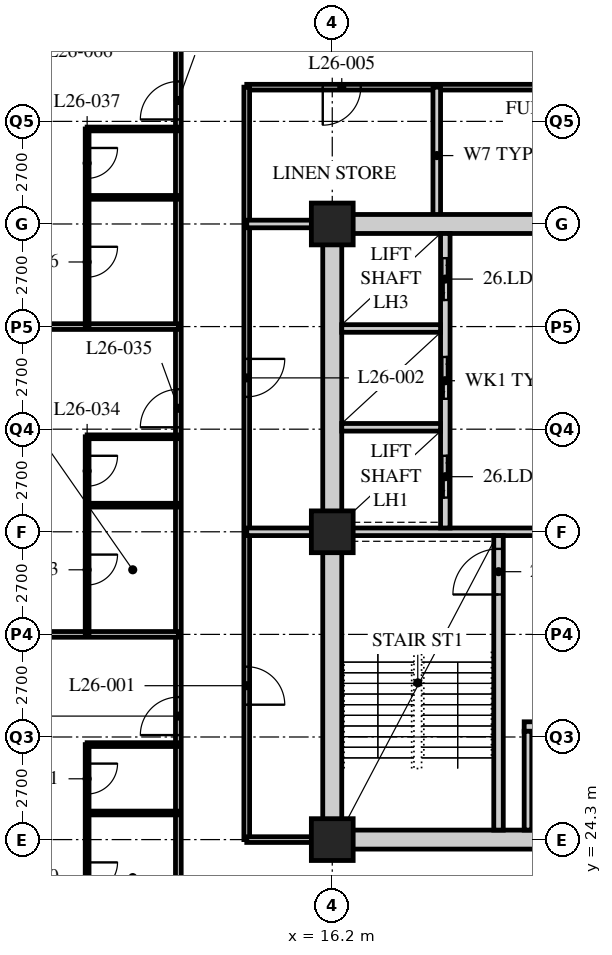
"""IFC4 building model, lengths in metres.
Left out: names, types, materials, properties, quantities, classifications, styles, units other than length and angle.
Written with IfcOpenShell. Run it as: python <this file> out.ifc"""

import sys

from ifc_helpers import new_model, si_unit, direction, frame, frame_2d, origin, origin_2d, place, context, subcontext, project, spatial, rectangle, hollow_rectangle, extrude, element, fill, save


model = new_model("IFC4")
c1 = context("Model", 3, precision=1e-05, world=origin(), true_north=direction((0.0, 1.0)))
c2 = subcontext(c1, "Body", "Model", "MODEL_VIEW")
j1 = project(units=[si_unit("LENGTHUNIT", "METRE"), si_unit("PLANEANGLEUNIT", "RADIAN")], contexts=[c1])
p1 = place(None, origin())
s1 = spatial("IfcSite", under=j1, at=p1, CompositionType="ELEMENT")
p2 = place(p1, origin())
s2 = spatial("IfcBuilding", under=s1, at=p2, CompositionType="ELEMENT")
p3 = place(p2, frame((0.0, 0.0, 106.8)))
s3 = spatial("IfcBuildingStorey", under=s2, at=p3, CompositionType="ELEMENT", Elevation=106.8)
for number, where, z_axis, x_axis in (
    (1, (16.2, 24.3, 0.0), (0.0, 0.0, 1.0), (1.0, 0.0, 0.0)),
    (2, (16.2, 32.4, 0.0), (0.0, 0.0, 1.0), (1.0, 0.0, 0.0)),
    (3, (16.2, 40.5, 0.0), (0.0, 0.0, 1.0), (1.0, 0.0, 0.0)),
):
    element("IfcColumn", number, at=place(p3, frame(where, z_axis=z_axis, x_axis=x_axis)), inside=s3, PredefinedType="COLUMN", context=c2, shape_type="SweptSolid", body=[
        extrude(hollow_rectangle(XDim=1.1, YDim=1.1, WallThickness=0.1, at=origin_2d()), origin(), (0.0, 0.0, 1.0), 3.4),
    ])
p4 = place(p3, frame((12.15, 21.6, 0.0), z_axis=(0.0, 0.0, 1.0), x_axis=(0.0, 1.0, 0.0)))
e4 = element("IfcWall", 4, at=p4, inside=s3, PredefinedType="PARTITIONING", context=c2, shape_type="SweptSolid", body=[
    extrude(rectangle(XDim=24.3, YDim=0.15, at=frame_2d((12.15, 0.0))), origin(), (0.0, 0.0, 1.0), 3.19),
])
p5 = place(p4, frame((5.45, 0.0, 0.0)))
e5 = element("IfcOpeningElement", 5, at=p5, cuts=e4, PredefinedType="OPENING", context=c2, shape_type="SweptSolid", body=[
    extrude(rectangle(XDim=1.0, YDim=2.1, at=frame_2d((0.5, 1.05))), frame((0.0, 0.085, 0.0), z_axis=(0.0, -1.0, 0.0), x_axis=(1.0, 0.0, 0.0)), (0.0, 0.0, 1.0), 0.17),
])
p6 = place(p4, frame((13.55, 0.0, 0.0)))
e6 = element("IfcOpeningElement", 6, at=p6, cuts=e4, PredefinedType="OPENING", context=c2, shape_type="SweptSolid", body=[
    extrude(rectangle(XDim=1.0, YDim=2.1, at=frame_2d((0.5, 1.05))), frame((0.0, 0.085, 0.0), z_axis=(0.0, -1.0, 0.0), x_axis=(1.0, 0.0, 0.0)), (0.0, 0.0, 1.0), 0.17),
])
p7 = place(p4, frame((21.65, 0.0, 0.0)))
e7 = element("IfcOpeningElement", 7, at=p7, cuts=e4, PredefinedType="OPENING", context=c2, shape_type="SweptSolid", body=[
    extrude(rectangle(XDim=1.0, YDim=2.1, at=frame_2d((0.5, 1.05))), frame((0.0, 0.085, 0.0), z_axis=(0.0, -1.0, 0.0), x_axis=(1.0, 0.0, 0.0)), (0.0, 0.0, 1.0), 0.17),
])
p8 = place(p3, frame((27.14, 44.1, 0.0), z_axis=(0.0, 0.0, 1.0), x_axis=(-1.0, 0.0, 0.0)))
e8 = element("IfcWall", 8, at=p8, inside=s3, PredefinedType="PARTITIONING", context=c2, shape_type="SweptSolid", body=[
    extrude(rectangle(XDim=13.19, YDim=0.15, at=frame_2d((6.595, 0.0))), origin(), (0.0, 0.0, 1.0), 3.19),
])
p9 = place(p8, frame((10.19, 0.0, 0.0)))
e9 = element("IfcOpeningElement", 9, at=p9, cuts=e8, PredefinedType="OPENING", context=c2, shape_type="SweptSolid", body=[
    extrude(rectangle(XDim=1.0, YDim=2.1, at=frame_2d((0.5, 1.05))), frame((0.0, 0.085, 0.0), z_axis=(0.0, -1.0, 0.0), x_axis=(1.0, 0.0, 0.0)), (0.0, 0.0, 1.0), 0.17),
])
p10 = place(p8, frame((3.59, 0.0, 0.0)))
e10 = element("IfcOpeningElement", 10, at=p10, cuts=e8, PredefinedType="OPENING", context=c2, shape_type="SweptSolid", body=[
    extrude(rectangle(XDim=1.0, YDim=2.1, at=frame_2d((0.5, 1.05))), frame((0.0, 0.085, 0.0), z_axis=(0.0, -1.0, 0.0), x_axis=(1.0, 0.0, 0.0)), (0.0, 0.0, 1.0), 0.17),
])
p11 = place(p3, frame((13.95, 44.1, 0.0), z_axis=(0.0, 0.0, 1.0), x_axis=(0.0, -1.0, 0.0)))
e11 = element("IfcWall", 11, at=p11, inside=s3, PredefinedType="PARTITIONING", context=c2, shape_type="SweptSolid", body=[
    extrude(rectangle(XDim=19.8, YDim=0.15, at=frame_2d((9.9, 0.0))), origin(), (0.0, 0.0, 1.0), 3.19),
])
p12 = place(p11, frame((15.25, 0.0, 0.0)))
e12 = element("IfcOpeningElement", 12, at=p12, cuts=e11, PredefinedType="OPENING", context=c2, shape_type="SweptSolid", body=[
    extrude(rectangle(XDim=1.0, YDim=2.1, at=frame_2d((0.5, 1.05))), frame((0.0, 0.085, 0.0), z_axis=(0.0, -1.0, 0.0), x_axis=(1.0, 0.0, 0.0)), (0.0, 0.0, 1.0), 0.17),
])
p13 = place(p11, frame((7.15, 0.0, 0.0)))
e13 = element("IfcOpeningElement", 13, at=p13, cuts=e11, PredefinedType="OPENING", context=c2, shape_type="SweptSolid", body=[
    extrude(rectangle(XDim=1.0, YDim=2.1, at=frame_2d((0.5, 1.05))), frame((0.0, 0.085, 0.0), z_axis=(0.0, -1.0, 0.0), x_axis=(1.0, 0.0, 0.0)), (0.0, 0.0, 1.0), 0.17),
])
p14 = place(p3, frame((13.95, 24.3, 0.0), z_axis=(0.0, 0.0, 1.0), x_axis=(1.0, 0.0, 0.0)))
e14 = element("IfcWall", 14, at=p14, inside=s3, PredefinedType="PARTITIONING", context=c2, shape_type="SweptSolid", body=[
    extrude(rectangle(XDim=2.05, YDim=0.15, at=frame_2d((1.025, 0.0))), origin(), (0.0, 0.0, 1.0), 3.19),
])
p15 = place(p3, frame((13.95, 32.4, 0.0), z_axis=(0.0, 0.0, 1.0), x_axis=(1.0, 0.0, 0.0)))
e15 = element("IfcWall", 15, at=p15, inside=s3, PredefinedType="SOLIDWALL", context=c2, shape_type="SweptSolid", body=[
    extrude(rectangle(XDim=2.25, YDim=0.2, at=frame_2d((1.125, 0.0))), origin(), (0.0, 0.0, 1.0), 3.19),
])
p16 = place(p3, frame((18.95, 44.1, 0.0), z_axis=(0.0, 0.0, 1.0), x_axis=(0.0, -1.0, 0.0)))
e16 = element("IfcWall", 16, at=p16, inside=s3, PredefinedType="SOLIDWALL", context=c2, shape_type="SweptSolid", body=[
    extrude(rectangle(XDim=3.6, YDim=0.2, at=frame_2d((1.8, 0.0))), origin(), (0.0, 0.0, 1.0), 3.19),
])
p17 = place(p3, frame((13.95, 40.5, 0.0), z_axis=(0.0, 0.0, 1.0), x_axis=(1.0, 0.0, 0.0)))
e17 = element("IfcWall", 17, at=p17, inside=s3, PredefinedType="SOLIDWALL", context=c2, shape_type="SweptSolid", body=[
    extrude(rectangle(XDim=2.25, YDim=0.2, at=frame_2d((1.125, 0.0))), origin(), (0.0, 0.0, 1.0), 3.19),
])
p18 = place(p3, frame((9.75, 21.6, 0.0), z_axis=(0.0, 0.0, 1.0), x_axis=(0.0, 1.0, 0.0)))
e18 = element("IfcWall", 18, at=p18, inside=s3, PredefinedType="PARTITIONING", context=c2, shape_type="SweptSolid", body=[
    extrude(rectangle(XDim=5.2, YDim=0.1, at=frame_2d((2.6, 0.0))), origin(), (0.0, 0.0, 1.0), 3.19),
])
p19 = place(p18, frame((1.3, 0.0, 0.0)))
e19 = element("IfcOpeningElement", 19, at=p19, cuts=e18, PredefinedType="OPENING", context=c2, shape_type="SweptSolid", body=[
    extrude(rectangle(XDim=0.8, YDim=2.1, at=frame_2d((0.4, 1.05))), frame((0.0, 0.06, 0.0), z_axis=(0.0, -1.0, 0.0), x_axis=(1.0, 0.0, 0.0)), (0.0, 0.0, 1.0), 0.12),
])
p20 = place(p18, frame((3.9, 0.0, 0.0)))
e20 = element("IfcOpeningElement", 20, at=p20, cuts=e18, PredefinedType="OPENING", context=c2, shape_type="SweptSolid", body=[
    extrude(rectangle(XDim=0.8, YDim=2.1, at=frame_2d((0.4, 1.05))), frame((0.0, 0.06, 0.0), z_axis=(0.0, -1.0, 0.0), x_axis=(1.0, 0.0, 0.0)), (0.0, 0.0, 1.0), 0.12),
])
for number, where, z_axis, x_axis in (
    (21, (12.15, 25.0, 0.0), (0.0, 0.0, 1.0), (-1.0, 0.0, 0.0)),
    (22, (12.15, 26.8, 0.0), (0.0, 0.0, 1.0), (-1.0, 0.0, 0.0)),
):
    element("IfcWall", number, at=place(p3, frame(where, z_axis=z_axis, x_axis=x_axis)), inside=s3, PredefinedType="PARTITIONING", context=c2, shape_type="SweptSolid", body=[
        extrude(rectangle(XDim=2.4, YDim=0.1, at=frame_2d((1.2, 0.0))), origin(), (0.0, 0.0, 1.0), 3.19),
    ])
p21 = place(p3, frame((12.15, 29.7, 0.0), z_axis=(0.0, 0.0, 1.0), x_axis=(-1.0, 0.0, 0.0)))
e23 = element("IfcWall", 23, at=p21, inside=s3, PredefinedType="PARTITIONING", context=c2, shape_type="SweptSolid", body=[
    extrude(rectangle(XDim=11.85, YDim=0.15, at=frame_2d((5.925, 0.0))), origin(), (0.0, 0.0, 1.0), 2.578),
])
p22 = place(p3, frame((9.75, 29.7, 0.0), z_axis=(0.0, 0.0, 1.0), x_axis=(0.0, 1.0, 0.0)))
e24 = element("IfcWall", 24, at=p22, inside=s3, PredefinedType="PARTITIONING", context=c2, shape_type="SweptSolid", body=[
    extrude(rectangle(XDim=5.2, YDim=0.1, at=frame_2d((2.6, 0.0))), origin(), (0.0, 0.0, 1.0), 3.19),
])
p23 = place(p22, frame((1.3, 0.0, 0.0)))
e25 = element("IfcOpeningElement", 25, at=p23, cuts=e24, PredefinedType="OPENING", context=c2, shape_type="SweptSolid", body=[
    extrude(rectangle(XDim=0.8, YDim=2.1, at=frame_2d((0.4, 1.05))), frame((0.0, 0.06, 0.0), z_axis=(0.0, -1.0, 0.0), x_axis=(1.0, 0.0, 0.0)), (0.0, 0.0, 1.0), 0.12),
])
p24 = place(p22, frame((3.9, 0.0, 0.0)))
e26 = element("IfcOpeningElement", 26, at=p24, cuts=e24, PredefinedType="OPENING", context=c2, shape_type="SweptSolid", body=[
    extrude(rectangle(XDim=0.8, YDim=2.1, at=frame_2d((0.4, 1.05))), frame((0.0, 0.06, 0.0), z_axis=(0.0, -1.0, 0.0), x_axis=(1.0, 0.0, 0.0)), (0.0, 0.0, 1.0), 0.12),
])
for number, where, z_axis, x_axis in (
    (27, (12.15, 33.1, 0.0), (0.0, 0.0, 1.0), (-1.0, 0.0, 0.0)),
    (28, (12.15, 34.9, 0.0), (0.0, 0.0, 1.0), (-1.0, 0.0, 0.0)),
):
    element("IfcWall", number, at=place(p3, frame(where, z_axis=z_axis, x_axis=x_axis)), inside=s3, PredefinedType="PARTITIONING", context=c2, shape_type="SweptSolid", body=[
        extrude(rectangle(XDim=2.4, YDim=0.1, at=frame_2d((1.2, 0.0))), origin(), (0.0, 0.0, 1.0), 3.19),
    ])
p25 = place(p3, frame((12.15, 37.8, 0.0), z_axis=(0.0, 0.0, 1.0), x_axis=(-1.0, 0.0, 0.0)))
e29 = element("IfcWall", 29, at=p25, inside=s3, PredefinedType="PARTITIONING", context=c2, shape_type="SweptSolid", body=[
    extrude(rectangle(XDim=11.85, YDim=0.15, at=frame_2d((5.925, 0.0))), origin(), (0.0, 0.0, 1.0), 2.578),
])
p26 = place(p3, frame((9.75, 37.8, 0.0), z_axis=(0.0, 0.0, 1.0), x_axis=(0.0, 1.0, 0.0)))
e30 = element("IfcWall", 30, at=p26, inside=s3, PredefinedType="PARTITIONING", context=c2, shape_type="SweptSolid", body=[
    extrude(rectangle(XDim=5.2, YDim=0.1, at=frame_2d((2.6, 0.0))), origin(), (0.0, 0.0, 1.0), 3.19),
])
p27 = place(p26, frame((1.3, 0.0, 0.0)))
e31 = element("IfcOpeningElement", 31, at=p27, cuts=e30, PredefinedType="OPENING", context=c2, shape_type="SweptSolid", body=[
    extrude(rectangle(XDim=0.8, YDim=2.1, at=frame_2d((0.4, 1.05))), frame((0.0, 0.06, 0.0), z_axis=(0.0, -1.0, 0.0), x_axis=(1.0, 0.0, 0.0)), (0.0, 0.0, 1.0), 0.12),
])
p28 = place(p26, frame((3.9, 0.0, 0.0)))
e32 = element("IfcOpeningElement", 32, at=p28, cuts=e30, PredefinedType="OPENING", context=c2, shape_type="SweptSolid", body=[
    extrude(rectangle(XDim=0.8, YDim=2.1, at=frame_2d((0.4, 1.05))), frame((0.0, 0.06, 0.0), z_axis=(0.0, -1.0, 0.0), x_axis=(1.0, 0.0, 0.0)), (0.0, 0.0, 1.0), 0.12),
])
for number, where, z_axis, x_axis in (
    (33, (12.15, 41.2, 0.0), (0.0, 0.0, 1.0), (-1.0, 0.0, 0.0)),
    (34, (12.15, 43.0, 0.0), (0.0, 0.0, 1.0), (-1.0, 0.0, 0.0)),
):
    element("IfcWall", number, at=place(p3, frame(where, z_axis=z_axis, x_axis=x_axis)), inside=s3, PredefinedType="PARTITIONING", context=c2, shape_type="SweptSolid", body=[
        extrude(rectangle(XDim=2.4, YDim=0.1, at=frame_2d((1.2, 0.0))), origin(), (0.0, 0.0, 1.0), 3.19),
    ])
p29 = place(p3, frame((15.95, 24.3, 0.0), z_axis=(0.0, 0.0, 1.0), x_axis=(1.0, 0.0, 0.0)))
e35 = element("IfcWall", 35, at=p29, inside=s3, PredefinedType="SOLIDWALL", context=c2, shape_type="SweptSolid", body=[
    extrude(rectangle(XDim=24.8, YDim=0.5, at=frame_2d((12.4, 0.0))), origin(), (0.0, 0.0, 1.0), 2.54),
])
p30 = place(p29, frame((11.5, 0.0, 0.0)))
e36 = element("IfcOpeningElement", 36, at=p30, cuts=e35, PredefinedType="OPENING", context=c2, shape_type="SweptSolid", body=[
    extrude(rectangle(XDim=1.8, YDim=2.4, at=frame_2d((0.9, 1.2))), frame((0.0, 0.26, 0.0), z_axis=(0.0, -1.0, 0.0), x_axis=(1.0, 0.0, 0.0)), (0.0, 0.0, 1.0), 0.52),
])
p31 = place(p3, frame((15.95, 40.5, 0.0), z_axis=(0.0, 0.0, 1.0), x_axis=(1.0, 0.0, 0.0)))
e37 = element("IfcWall", 37, at=p31, inside=s3, PredefinedType="SOLIDWALL", context=c2, shape_type="SweptSolid", body=[
    extrude(rectangle(XDim=24.8, YDim=0.5, at=frame_2d((12.4, 0.0))), origin(), (0.0, 0.0, 1.0), 2.54),
])
p32 = place(p31, frame((11.5, 0.0, 0.0)))
e38 = element("IfcOpeningElement", 38, at=p32, cuts=e37, PredefinedType="OPENING", context=c2, shape_type="SweptSolid", body=[
    extrude(rectangle(XDim=1.8, YDim=2.4, at=frame_2d((0.9, 1.2))), frame((0.0, 0.26, 0.0), z_axis=(0.0, -1.0, 0.0), x_axis=(1.0, 0.0, 0.0)), (0.0, 0.0, 1.0), 0.52),
])
p33 = place(p3, frame((16.2, 24.55, 0.0), z_axis=(0.0, 0.0, 1.0), x_axis=(0.0, 1.0, 0.0)))
e39 = element("IfcWall", 39, at=p33, inside=s3, PredefinedType="SOLIDWALL", context=c2, shape_type="SweptSolid", body=[
    extrude(rectangle(XDim=15.7, YDim=0.5, at=frame_2d((7.85, 0.0))), origin(), (0.0, 0.0, 1.0), 2.578),
])
p34 = place(p3, frame((16.45, 32.4, 0.0), z_axis=(0.0, 0.0, 1.0), x_axis=(1.0, 0.0, 0.0)))
e40 = element("IfcWall", 40, at=p34, inside=s3, PredefinedType="SOLIDWALL", context=c2, shape_type="SweptSolid", body=[
    extrude(rectangle(XDim=7.95, YDim=0.2, at=frame_2d((3.975, 0.0))), origin(), (0.0, 0.0, 1.0), 2.578),
])
p35 = place(p3, frame((20.575, 24.55, 0.0), z_axis=(0.0, 0.0, 1.0), x_axis=(0.0, 1.0, 0.0)))
e41 = element("IfcWall", 41, at=p35, inside=s3, PredefinedType="SOLIDWALL", context=c2, shape_type="SweptSolid", body=[
    extrude(rectangle(XDim=7.75, YDim=0.25, at=frame_2d((3.875, 0.0))), origin(), (0.0, 0.0, 1.0), 3.19),
])
p36 = place(p35, frame((6.2, 0.0, 0.0)))
e42 = element("IfcOpeningElement", 42, at=p36, cuts=e41, PredefinedType="OPENING", context=c2, shape_type="SweptSolid", body=[
    extrude(rectangle(XDim=1.2, YDim=2.1, at=frame_2d((0.6, 1.05))), frame((0.0, 0.135, 0.0), z_axis=(0.0, -1.0, 0.0), x_axis=(1.0, 0.0, 0.0)), (0.0, 0.0, 1.0), 0.27),
])
p37 = place(p3, frame((21.25, 27.275, 0.0), z_axis=(0.0, 0.0, 1.0), x_axis=(1.0, 0.0, 0.0)))
e43 = element("IfcWall", 43, at=p37, inside=s3, PredefinedType="SOLIDWALL", context=c2, shape_type="SweptSolid", body=[
    extrude(rectangle(XDim=2.95, YDim=0.25, at=frame_2d((1.475, 0.0))), origin(), (0.0, 0.0, 1.0), 3.19),
])
p38 = place(p37, frame((0.95, 0.0, 0.0)))
e44 = element("IfcOpeningElement", 44, at=p38, cuts=e43, PredefinedType="OPENING", context=c2, shape_type="SweptSolid", body=[
    extrude(rectangle(XDim=1.1, YDim=2.4, at=frame_2d((0.55, 1.2))), frame((0.0, 0.135, 0.0), z_axis=(0.0, -1.0, 0.0), x_axis=(1.0, 0.0, 0.0)), (0.0, 0.0, 1.0), 0.27),
])
p39 = place(p3, frame((21.35, 24.55, 0.0), z_axis=(0.0, 0.0, 1.0), x_axis=(0.0, 1.0, 0.0)))
e45 = element("IfcWall", 45, at=p39, inside=s3, PredefinedType="SOLIDWALL", context=c2, shape_type="SweptSolid", body=[
    extrude(rectangle(XDim=2.6, YDim=0.2, at=frame_2d((1.3, 0.0))), origin(), (0.0, 0.0, 1.0), 3.19),
])
p40 = place(p3, frame((19.175, 32.5, 0.0), z_axis=(0.0, 0.0, 1.0), x_axis=(0.0, 1.0, 0.0)))
e46 = element("IfcWall", 46, at=p40, inside=s3, PredefinedType="SOLIDWALL", context=c2, shape_type="SweptSolid", body=[
    extrude(rectangle(XDim=7.75, YDim=0.25, at=frame_2d((3.875, 0.0))), origin(), (0.0, 0.0, 1.0), 3.19),
])
p41 = place(p40, frame((0.8, 0.0, 0.0)))
e47 = element("IfcOpeningElement", 47, at=p41, cuts=e46, PredefinedType="OPENING", context=c2, shape_type="SweptSolid", body=[
    extrude(rectangle(XDim=1.1, YDim=2.4, at=frame_2d((0.55, 1.2))), frame((0.0, 0.135, 0.0), z_axis=(0.0, -1.0, 0.0), x_axis=(1.0, 0.0, 0.0)), (0.0, 0.0, 1.0), 0.27),
])
p42 = place(p40, frame((3.4, 0.0, 0.0)))
e48 = element("IfcOpeningElement", 48, at=p42, cuts=e46, PredefinedType="OPENING", context=c2, shape_type="SweptSolid", body=[
    extrude(rectangle(XDim=1.1, YDim=2.4, at=frame_2d((0.55, 1.2))), frame((0.0, 0.135, 0.0), z_axis=(0.0, -1.0, 0.0), x_axis=(1.0, 0.0, 0.0)), (0.0, 0.0, 1.0), 0.27),
])
p43 = place(p40, frame((6.0, 0.0, 0.0)))
e49 = element("IfcOpeningElement", 49, at=p43, cuts=e46, PredefinedType="OPENING", context=c2, shape_type="SweptSolid", body=[
    extrude(rectangle(XDim=1.1, YDim=2.4, at=frame_2d((0.55, 1.2))), frame((0.0, 0.135, 0.0), z_axis=(0.0, -1.0, 0.0), x_axis=(1.0, 0.0, 0.0)), (0.0, 0.0, 1.0), 0.27),
])
for number, where, z_axis, x_axis in (
    (50, (16.45, 35.15, 0.0), (0.0, 0.0, 1.0), (1.0, 0.0, 0.0)),
    (51, (16.45, 37.75, 0.0), (0.0, 0.0, 1.0), (1.0, 0.0, 0.0)),
):
    element("IfcWall", number, at=place(p3, frame(where, z_axis=z_axis, x_axis=x_axis)), inside=s3, PredefinedType="SOLIDWALL", context=c2, shape_type="SweptSolid", body=[
        extrude(rectangle(XDim=2.6, YDim=0.2, at=frame_2d((1.3, 0.0))), origin(), (0.0, 0.0, 1.0), 3.19),
    ])
p44 = place(p12, origin())
e52 = element("IfcDoor", 52, at=p44, inside=s3, OperationType="SINGLE_SWING_RIGHT", PredefinedType="DOOR", context=c2, shape_type="SweptSolid", body=[
    extrude(rectangle(XDim=1.0, YDim=2.1, at=frame_2d((0.5, 1.05))), frame((0.0, 0.025, 0.0), z_axis=(0.0, -1.0, 0.0), x_axis=(1.0, 0.0, 0.0)), (0.0, 0.0, 1.0), 0.05),
])
fill(e12, e52)
p45 = place(p13, origin())
e53 = element("IfcDoor", 53, at=p45, inside=s3, OperationType="SINGLE_SWING_LEFT", PredefinedType="DOOR", context=c2, shape_type="SweptSolid", body=[
    extrude(rectangle(XDim=1.0, YDim=2.1, at=frame_2d((0.5, 1.05))), frame((0.0, 0.025, 0.0), z_axis=(0.0, -1.0, 0.0), x_axis=(1.0, 0.0, 0.0)), (0.0, 0.0, 1.0), 0.05),
])
fill(e13, e53)
p46 = place(p9, origin())
e54 = element("IfcDoor", 54, at=p46, inside=s3, OperationType="SINGLE_SWING_RIGHT", PredefinedType="DOOR", context=c2, shape_type="SweptSolid", body=[
    extrude(rectangle(XDim=1.0, YDim=2.1, at=frame_2d((0.5, 1.05))), frame((0.0, 0.025, 0.0), z_axis=(0.0, -1.0, 0.0), x_axis=(1.0, 0.0, 0.0)), (0.0, 0.0, 1.0), 0.05),
])
fill(e9, e54)
p47 = place(p19, origin())
e55 = element("IfcDoor", 55, at=p47, inside=s3, OperationType="SINGLE_SWING_LEFT", PredefinedType="DOOR", context=c2, shape_type="SweptSolid", body=[
    extrude(rectangle(XDim=0.8, YDim=2.1, at=frame_2d((0.4, 1.05))), frame((0.0, 0.025, 0.0), z_axis=(0.0, -1.0, 0.0), x_axis=(1.0, 0.0, 0.0)), (0.0, 0.0, 1.0), 0.05),
])
fill(e19, e55)
p48 = place(p20, origin())
e56 = element("IfcDoor", 56, at=p48, inside=s3, OperationType="SINGLE_SWING_LEFT", PredefinedType="DOOR", context=c2, shape_type="SweptSolid", body=[
    extrude(rectangle(XDim=0.8, YDim=2.1, at=frame_2d((0.4, 1.05))), frame((0.0, 0.025, 0.0), z_axis=(0.0, -1.0, 0.0), x_axis=(1.0, 0.0, 0.0)), (0.0, 0.0, 1.0), 0.05),
])
fill(e20, e56)
p49 = place(p5, origin())
e57 = element("IfcDoor", 57, at=p49, inside=s3, OperationType="SINGLE_SWING_LEFT", PredefinedType="DOOR", context=c2, shape_type="SweptSolid", body=[
    extrude(rectangle(XDim=1.0, YDim=2.1, at=frame_2d((0.5, 1.05))), frame((0.0, 0.025, 0.0), z_axis=(0.0, -1.0, 0.0), x_axis=(1.0, 0.0, 0.0)), (0.0, 0.0, 1.0), 0.05),
])
fill(e5, e57)
p50 = place(p23, origin())
e58 = element("IfcDoor", 58, at=p50, inside=s3, OperationType="SINGLE_SWING_LEFT", PredefinedType="DOOR", context=c2, shape_type="SweptSolid", body=[
    extrude(rectangle(XDim=0.8, YDim=2.1, at=frame_2d((0.4, 1.05))), frame((0.0, 0.025, 0.0), z_axis=(0.0, -1.0, 0.0), x_axis=(1.0, 0.0, 0.0)), (0.0, 0.0, 1.0), 0.05),
])
fill(e25, e58)
p51 = place(p24, origin())
e59 = element("IfcDoor", 59, at=p51, inside=s3, OperationType="SINGLE_SWING_LEFT", PredefinedType="DOOR", context=c2, shape_type="SweptSolid", body=[
    extrude(rectangle(XDim=0.8, YDim=2.1, at=frame_2d((0.4, 1.05))), frame((0.0, 0.025, 0.0), z_axis=(0.0, -1.0, 0.0), x_axis=(1.0, 0.0, 0.0)), (0.0, 0.0, 1.0), 0.05),
])
fill(e26, e59)
p52 = place(p6, origin())
e60 = element("IfcDoor", 60, at=p52, inside=s3, OperationType="SINGLE_SWING_LEFT", PredefinedType="DOOR", context=c2, shape_type="SweptSolid", body=[
    extrude(rectangle(XDim=1.0, YDim=2.1, at=frame_2d((0.5, 1.05))), frame((0.0, 0.025, 0.0), z_axis=(0.0, -1.0, 0.0), x_axis=(1.0, 0.0, 0.0)), (0.0, 0.0, 1.0), 0.05),
])
fill(e6, e60)
p53 = place(p27, origin())
e61 = element("IfcDoor", 61, at=p53, inside=s3, OperationType="SINGLE_SWING_LEFT", PredefinedType="DOOR", context=c2, shape_type="SweptSolid", body=[
    extrude(rectangle(XDim=0.8, YDim=2.1, at=frame_2d((0.4, 1.05))), frame((0.0, 0.025, 0.0), z_axis=(0.0, -1.0, 0.0), x_axis=(1.0, 0.0, 0.0)), (0.0, 0.0, 1.0), 0.05),
])
fill(e31, e61)
p54 = place(p28, origin())
e62 = element("IfcDoor", 62, at=p54, inside=s3, OperationType="SINGLE_SWING_LEFT", PredefinedType="DOOR", context=c2, shape_type="SweptSolid", body=[
    extrude(rectangle(XDim=0.8, YDim=2.1, at=frame_2d((0.4, 1.05))), frame((0.0, 0.025, 0.0), z_axis=(0.0, -1.0, 0.0), x_axis=(1.0, 0.0, 0.0)), (0.0, 0.0, 1.0), 0.05),
])
fill(e32, e62)
p55 = place(p7, origin())
e63 = element("IfcDoor", 63, at=p55, inside=s3, OperationType="SINGLE_SWING_LEFT", PredefinedType="DOOR", context=c2, shape_type="SweptSolid", body=[
    extrude(rectangle(XDim=1.0, YDim=2.1, at=frame_2d((0.5, 1.05))), frame((0.0, 0.025, 0.0), z_axis=(0.0, -1.0, 0.0), x_axis=(1.0, 0.0, 0.0)), (0.0, 0.0, 1.0), 0.05),
])
fill(e7, e63)
p56 = place(p36, origin())
e64 = element("IfcDoor", 64, at=p56, inside=s3, OperationType="SINGLE_SWING_LEFT", PredefinedType="DOOR", context=c2, shape_type="SweptSolid", body=[
    extrude(rectangle(XDim=1.2, YDim=2.1, at=frame_2d((0.6, 1.05))), frame((0.0, 0.025, 0.0), z_axis=(0.0, -1.0, 0.0), x_axis=(1.0, 0.0, 0.0)), (0.0, 0.0, 1.0), 0.05),
])
fill(e42, e64)
p57 = place(p41, origin())
e65 = element("IfcDoor", 65, at=p57, inside=s3, OperationType="DOUBLE_DOOR_SLIDING", PredefinedType="DOOR", context=c2, shape_type="SweptSolid", body=[
    extrude(rectangle(XDim=1.1, YDim=2.4, at=frame_2d((0.55, 1.2))), frame((0.0, 0.025, 0.0), z_axis=(0.0, -1.0, 0.0), x_axis=(1.0, 0.0, 0.0)), (0.0, 0.0, 1.0), 0.05),
])
fill(e47, e65)
p58 = place(p42, origin())
e66 = element("IfcDoor", 66, at=p58, inside=s3, OperationType="DOUBLE_DOOR_SLIDING", PredefinedType="DOOR", context=c2, shape_type="SweptSolid", body=[
    extrude(rectangle(XDim=1.1, YDim=2.4, at=frame_2d((0.55, 1.2))), frame((0.0, 0.025, 0.0), z_axis=(0.0, -1.0, 0.0), x_axis=(1.0, 0.0, 0.0)), (0.0, 0.0, 1.0), 0.05),
])
fill(e48, e66)
p59 = place(p43, origin())
e67 = element("IfcDoor", 67, at=p59, inside=s3, OperationType="DOUBLE_DOOR_SLIDING", PredefinedType="DOOR", context=c2, shape_type="SweptSolid", body=[
    extrude(rectangle(XDim=1.1, YDim=2.4, at=frame_2d((0.55, 1.2))), frame((0.0, 0.025, 0.0), z_axis=(0.0, -1.0, 0.0), x_axis=(1.0, 0.0, 0.0)), (0.0, 0.0, 1.0), 0.05),
])
fill(e49, e67)
save(model, sys.argv[1])
